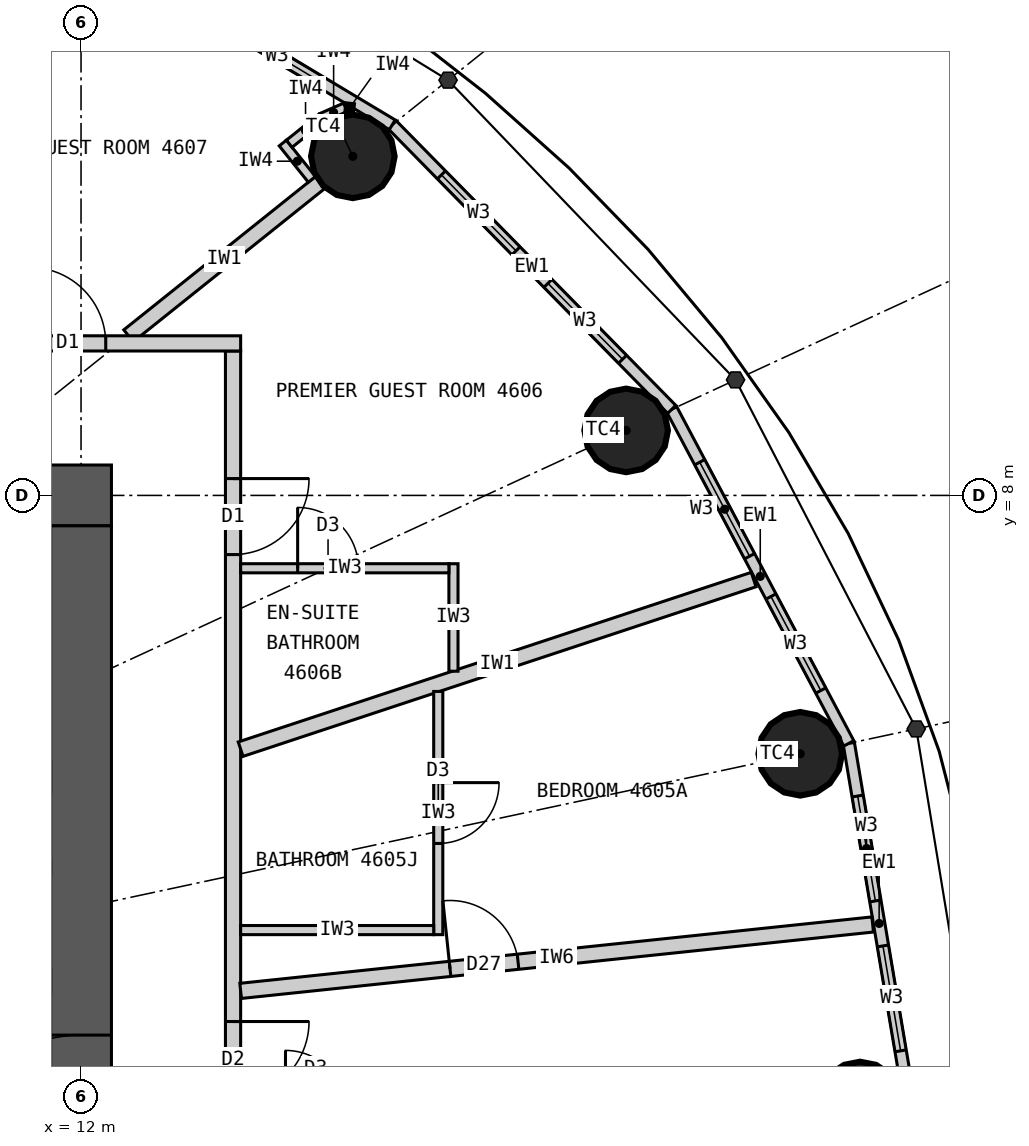
"""IFC4 building model, lengths in metres.
Left out: names, types, materials, properties, quantities, classifications, styles, units other than length and angle.
Written with IfcOpenShell. Run it as: python <this file> out.ifc"""

import sys

from ifc_helpers import new_model, si_unit, direction, frame, frame_2d, origin, origin_2d, place, context, subcontext, project, spatial, rectangle, circle, extrude, element, fill, save


model = new_model("IFC4")
c1 = context("Model", 3, precision=1e-05, world=origin(), true_north=direction((0.0, 1.0)))
c2 = subcontext(c1, "Body", "Model", "MODEL_VIEW")
j1 = project(units=[si_unit("LENGTHUNIT", "METRE"), si_unit("PLANEANGLEUNIT", "RADIAN")], contexts=[c1])
p1 = place(None, origin())
s1 = spatial("IfcSite", under=j1, at=p1, CompositionType="ELEMENT")
p2 = place(p1, origin())
s2 = spatial("IfcBuilding", under=s1, at=p2, CompositionType="ELEMENT")
p3 = place(p2, frame((0.0, 0.0, 173.1)))
s3 = spatial("IfcBuildingStorey", under=s2, at=p3, CompositionType="ELEMENT", Elevation=173.1)
for number, where, z_axis, x_axis in (
    (1, (22.25, 0.0, 0.0), (0.0, 0.0, 1.0), (1.0, 0.0, 0.0)),
    (2, (21.463, 4.601, 0.0), (0.0, 0.0, 1.0), (1.0, 0.0, 0.0)),
    (3, (19.172, 8.855, 0.0), (0.0, 0.0, 1.0), (1.0, 0.0, 0.0)),
    (4, (15.576, 12.461, 0.0), (0.0, 0.0, 1.0), (1.0, 0.0, 0.0)),
):
    element("IfcColumn", number, at=place(p3, frame(where, z_axis=z_axis, x_axis=x_axis)), inside=s3, PredefinedType="COLUMN", context=c2, shape_type="SweptSolid", body=[
        extrude(circle(Radius=0.55, at=origin_2d()), origin(), (0.0, 0.0, 1.0), 3.3),
    ])
p4 = place(p3, frame((-12.4, 8.0, 0.0), z_axis=(0.0, 0.0, 1.0), x_axis=(1.0, 0.0, 0.0)))
e5 = element("IfcWall", 5, at=p4, inside=s3, PredefinedType="SHEAR", context=c2, shape_type="SweptSolid", body=[
    extrude(rectangle(XDim=24.8, YDim=0.8, at=frame_2d((12.4, 0.0))), origin(), (0.0, 0.0, 1.0), 3.3),
])
p5 = place(p4, frame((11.1, 0.0, 0.0)))
e6 = element("IfcOpeningElement", 6, at=p5, cuts=e5, PredefinedType="OPENING", context=c2, shape_type="SweptSolid", body=[
    extrude(rectangle(XDim=1.2, YDim=2.2, at=frame_2d((0.6, 1.1))), frame((0.0, 0.41, 0.0), z_axis=(0.0, -1.0, 0.0), x_axis=(1.0, 0.0, 0.0)), (0.0, 0.0, 1.0), 0.82),
])
p6 = place(p4, frame((18.7, 0.0, 0.0)))
e7 = element("IfcOpeningElement", 7, at=p6, cuts=e5, PredefinedType="OPENING", context=c2, shape_type="SweptSolid", body=[
    extrude(rectangle(XDim=0.9, YDim=2.2, at=frame_2d((0.45, 1.1))), frame((0.0, 0.41, 0.0), z_axis=(0.0, -1.0, 0.0), x_axis=(1.0, 0.0, 0.0)), (0.0, 0.0, 1.0), 0.82),
])
p7 = place(p3, frame((12.0, -7.6, 0.0), z_axis=(0.0, 0.0, 1.0), x_axis=(0.0, 1.0, 0.0)))
e8 = element("IfcWall", 8, at=p7, inside=s3, PredefinedType="SHEAR", context=c2, shape_type="SweptSolid", body=[
    extrude(rectangle(XDim=15.2, YDim=0.8, at=frame_2d((7.6, 0.0))), origin(), (0.0, 0.0, 1.0), 3.3),
])
p8 = place(p7, frame((6.7, 0.0, 0.0)))
e9 = element("IfcOpeningElement", 9, at=p8, cuts=e8, PredefinedType="OPENING", context=c2, shape_type="SweptSolid", body=[
    extrude(rectangle(XDim=1.8, YDim=2.2, at=frame_2d((0.9, 1.1))), frame((0.0, 0.41, 0.0), z_axis=(0.0, -1.0, 0.0), x_axis=(1.0, 0.0, 0.0)), (0.0, 0.0, 1.0), 0.82),
])
p9 = place(p3, frame((22.9, 0.0, 0.0), z_axis=(0.0, 0.0, 1.0), x_axis=(-0.166162111254, 0.986098449843, 0.0)))
e10 = element("IfcWall", 10, at=p9, inside=s3, PredefinedType="ELEMENTEDWALL", context=c2, shape_type="SweptSolid", body=[
    extrude(rectangle(XDim=4.805, YDim=0.15, at=frame_2d((2.402, 0.0))), origin(), (0.0, 0.0, 1.0), 3.12),
])
p10 = place(p9, frame((0.702, 0.0, 0.9)))
e11 = element("IfcOpeningElement", 11, at=p10, cuts=e10, PredefinedType="OPENING", context=c2, shape_type="SweptSolid", body=[
    extrude(rectangle(XDim=1.4, YDim=1.9, at=frame_2d((0.7, 0.95))), frame((0.0, 0.085, 0.0), z_axis=(0.0, -1.0, 0.0), x_axis=(1.0, 0.0, 0.0)), (0.0, 0.0, 1.0), 0.17),
])
p11 = place(p9, frame((2.702, 0.0, 0.9)))
e12 = element("IfcOpeningElement", 12, at=p11, cuts=e10, PredefinedType="OPENING", context=c2, shape_type="SweptSolid", body=[
    extrude(rectangle(XDim=1.4, YDim=1.9, at=frame_2d((0.7, 0.95))), frame((0.0, 0.085, 0.0), z_axis=(0.0, -1.0, 0.0), x_axis=(1.0, 0.0, 0.0)), (0.0, 0.0, 1.0), 0.17),
])
p12 = place(p3, frame((22.102, 4.738, 0.0), z_axis=(0.0, 0.0, 1.0), x_axis=(-0.468428906714, 0.883501193748, 0.0)))
e13 = element("IfcWall", 13, at=p12, inside=s3, PredefinedType="ELEMENTEDWALL", context=c2, shape_type="SweptSolid", body=[
    extrude(rectangle(XDim=4.974, YDim=0.15, at=frame_2d((2.487, 0.0))), origin(), (0.0, 0.0, 1.0), 3.12),
])
p13 = place(p12, frame((0.787, 0.0, 0.9)))
e14 = element("IfcOpeningElement", 14, at=p13, cuts=e13, PredefinedType="OPENING", context=c2, shape_type="SweptSolid", body=[
    extrude(rectangle(XDim=1.4, YDim=1.9, at=frame_2d((0.7, 0.95))), frame((0.0, 0.085, 0.0), z_axis=(0.0, -1.0, 0.0), x_axis=(1.0, 0.0, 0.0)), (0.0, 0.0, 1.0), 0.17),
])
p14 = place(p12, frame((2.787, 0.0, 0.9)))
e15 = element("IfcOpeningElement", 15, at=p14, cuts=e13, PredefinedType="OPENING", context=c2, shape_type="SweptSolid", body=[
    extrude(rectangle(XDim=1.4, YDim=1.9, at=frame_2d((0.7, 0.95))), frame((0.0, 0.085, 0.0), z_axis=(0.0, -1.0, 0.0), x_axis=(1.0, 0.0, 0.0)), (0.0, 0.0, 1.0), 0.17),
])
p15 = place(p3, frame((19.772, 9.132, 0.0), z_axis=(0.0, 0.0, 1.0), x_axis=(-0.700727467776, 0.71342905457, 0.0)))
e16 = element("IfcWall", 16, at=p15, inside=s3, PredefinedType="ELEMENTEDWALL", context=c2, shape_type="SweptSolid", body=[
    extrude(rectangle(XDim=5.247, YDim=0.15, at=frame_2d((2.624, 0.0))), origin(), (0.0, 0.0, 1.0), 3.12),
])
p16 = place(p15, frame((0.924, 0.0, 0.9)))
e17 = element("IfcOpeningElement", 17, at=p16, cuts=e16, PredefinedType="OPENING", context=c2, shape_type="SweptSolid", body=[
    extrude(rectangle(XDim=1.4, YDim=1.9, at=frame_2d((0.7, 0.95))), frame((0.0, 0.085, 0.0), z_axis=(0.0, -1.0, 0.0), x_axis=(1.0, 0.0, 0.0)), (0.0, 0.0, 1.0), 0.17),
])
p17 = place(p15, frame((2.924, 0.0, 0.9)))
e18 = element("IfcOpeningElement", 18, at=p17, cuts=e16, PredefinedType="OPENING", context=c2, shape_type="SweptSolid", body=[
    extrude(rectangle(XDim=1.4, YDim=1.9, at=frame_2d((0.7, 0.95))), frame((0.0, 0.085, 0.0), z_axis=(0.0, -1.0, 0.0), x_axis=(1.0, 0.0, 0.0)), (0.0, 0.0, 1.0), 0.17),
])
p18 = place(p3, frame((16.095, 12.876, 0.0), z_axis=(0.0, 0.0, 1.0), x_axis=(-0.857695199231, 0.514158482587, 0.0)))
e19 = element("IfcWall", 19, at=p18, inside=s3, PredefinedType="ELEMENTEDWALL", context=c2, shape_type="SweptSolid", body=[
    extrude(rectangle(XDim=5.536, YDim=0.15, at=frame_2d((2.768, 0.0))), origin(), (0.0, 0.0, 1.0), 3.12),
])
p19 = place(p18, frame((1.068, 0.0, 0.9)))
e20 = element("IfcOpeningElement", 20, at=p19, cuts=e19, PredefinedType="OPENING", context=c2, shape_type="SweptSolid", body=[
    extrude(rectangle(XDim=1.4, YDim=1.9, at=frame_2d((0.7, 0.95))), frame((0.0, 0.085, 0.0), z_axis=(0.0, -1.0, 0.0), x_axis=(1.0, 0.0, 0.0)), (0.0, 0.0, 1.0), 0.17),
])
p20 = place(p18, frame((3.068, 0.0, 0.9)))
e21 = element("IfcOpeningElement", 21, at=p20, cuts=e19, PredefinedType="OPENING", context=c2, shape_type="SweptSolid", body=[
    extrude(rectangle(XDim=1.4, YDim=1.9, at=frame_2d((0.7, 0.95))), frame((0.0, 0.085, 0.0), z_axis=(0.0, -1.0, 0.0), x_axis=(1.0, 0.0, 0.0)), (0.0, 0.0, 1.0), 0.17),
])
p21 = place(p3, frame((14.0, -9.9, 0.0), z_axis=(0.0, 0.0, 1.0), x_axis=(0.0, 1.0, 0.0)))
e22 = element("IfcWall", 22, at=p21, inside=s3, PredefinedType="PARTITIONING", context=c2, shape_type="SweptSolid", body=[
    extrude(rectangle(XDim=19.8, YDim=0.2, at=frame_2d((9.9, 0.0))), origin(), (0.0, 0.0, 1.0), 3.12),
])
p22 = place(p21, frame((3.688, 0.0, 0.0)))
e23 = element("IfcOpeningElement", 23, at=p22, cuts=e22, PredefinedType="OPENING", context=c2, shape_type="SweptSolid", body=[
    extrude(rectangle(XDim=1.0, YDim=2.2, at=frame_2d((0.5, 1.1))), frame((0.0, 0.11, 0.0), z_axis=(0.0, -1.0, 0.0), x_axis=(1.0, 0.0, 0.0)), (0.0, 0.0, 1.0), 0.22),
])
p23 = place(p21, frame((9.979, 0.0, 0.0)))
e24 = element("IfcOpeningElement", 24, at=p23, cuts=e22, PredefinedType="OPENING", context=c2, shape_type="SweptSolid", body=[
    extrude(rectangle(XDim=1.0, YDim=2.2, at=frame_2d((0.5, 1.1))), frame((0.0, 0.11, 0.0), z_axis=(0.0, -1.0, 0.0), x_axis=(1.0, 0.0, 0.0)), (0.0, 0.0, 1.0), 0.22),
])
p24 = place(p21, frame((17.122, 0.0, 0.0)))
e25 = element("IfcOpeningElement", 25, at=p24, cuts=e22, PredefinedType="OPENING", context=c2, shape_type="SweptSolid", body=[
    extrude(rectangle(XDim=1.0, YDim=2.2, at=frame_2d((0.5, 1.1))), frame((0.0, 0.11, 0.0), z_axis=(0.0, -1.0, 0.0), x_axis=(1.0, 0.0, 0.0)), (0.0, 0.0, 1.0), 0.22),
])
p25 = place(p3, frame((14.1, 1.481, 0.0), z_axis=(0.0, 0.0, 1.0), x_axis=(0.994524794819, 0.104500873159, 0.0)))
e26 = element("IfcWall", 26, at=p25, inside=s3, PredefinedType="PARTITIONING", context=c2, shape_type="SweptSolid", body=[
    extrude(rectangle(XDim=8.362, YDim=0.2, at=frame_2d((4.181, 0.0))), origin(), (0.0, 0.0, 1.0), 2.47),
])
p26 = place(p25, frame((2.77, 0.0, 0.0)))
e27 = element("IfcOpeningElement", 27, at=p26, cuts=e26, PredefinedType="OPENING", context=c2, shape_type="SweptSolid", body=[
    extrude(rectangle(XDim=0.9, YDim=2.1, at=frame_2d((0.45, 1.05))), frame((0.0, 0.11, 0.0), z_axis=(0.0, -1.0, 0.0), x_axis=(1.0, 0.0, 0.0)), (0.0, 0.0, 1.0), 0.22),
])
p27 = place(p3, frame((14.1, 4.661, 0.0), z_axis=(0.0, 0.0, 1.0), x_axis=(0.949453216399, 0.313908569285, 0.0)))
e28 = element("IfcWall", 28, at=p27, inside=s3, PredefinedType="PARTITIONING", context=c2, shape_type="SweptSolid", body=[
    extrude(rectangle(XDim=7.109, YDim=0.2, at=frame_2d((3.554, 0.0))), origin(), (0.0, 0.0, 1.0), 3.12),
])
p28 = place(p3, frame((12.625, 10.1, 0.0), z_axis=(0.0, 0.0, 1.0), x_axis=(0.780876185034, 0.624685827954, 0.0)))
e29 = element("IfcWall", 29, at=p28, inside=s3, PredefinedType="PARTITIONING", context=c2, shape_type="SweptSolid", body=[
    extrude(rectangle(XDim=3.229, YDim=0.2, at=frame_2d((1.615, 0.0))), origin(), (0.0, 0.0, 1.0), 2.42),
])
p29 = place(p3, frame((16.7, 5.421, 0.0), z_axis=(0.0, 0.0, 1.0), x_axis=(0.0, -1.0, 0.0)))
e30 = element("IfcWall", 30, at=p29, inside=s3, PredefinedType="PARTITIONING", context=c2, shape_type="SweptSolid", body=[
    extrude(rectangle(XDim=3.2, YDim=0.12, at=frame_2d((1.6, 0.0))), origin(), (0.0, 0.0, 1.0), 3.12),
])
p30 = place(p29, frame((1.2, 0.0, 0.0)))
e31 = element("IfcOpeningElement", 31, at=p30, cuts=e30, PredefinedType="OPENING", context=c2, shape_type="SweptSolid", body=[
    extrude(rectangle(XDim=0.8, YDim=2.1, at=frame_2d((0.4, 1.05))), frame((0.0, 0.07, 0.0), z_axis=(0.0, -1.0, 0.0), x_axis=(1.0, 0.0, 0.0)), (0.0, 0.0, 1.0), 0.14),
])
p31 = place(p3, frame((14.1, 2.281, 0.0), z_axis=(0.0, 0.0, 1.0), x_axis=(1.0, 0.0, 0.0)))
e32 = element("IfcWall", 32, at=p31, inside=s3, PredefinedType="PARTITIONING", context=c2, shape_type="SweptSolid", body=[
    extrude(rectangle(XDim=2.54, YDim=0.12, at=frame_2d((1.27, 0.0))), origin(), (0.0, 0.0, 1.0), 3.12),
])
p32 = place(p3, frame((16.9, 5.687, 0.0), z_axis=(0.0, 0.0, 1.0), x_axis=(0.0, 1.0, 0.0)))
e33 = element("IfcWall", 33, at=p32, inside=s3, PredefinedType="PARTITIONING", context=c2, shape_type="SweptSolid", body=[
    extrude(rectangle(XDim=1.414, YDim=0.12, at=frame_2d((0.707, 0.0))), origin(), (0.0, 0.0, 1.0), 3.12),
])
p33 = place(p3, frame((14.1, 7.042, 0.0), z_axis=(0.0, 0.0, 1.0), x_axis=(1.0, 0.0, 0.0)))
e34 = element("IfcWall", 34, at=p33, inside=s3, PredefinedType="PARTITIONING", context=c2, shape_type="SweptSolid", body=[
    extrude(rectangle(XDim=2.74, YDim=0.12, at=frame_2d((1.37, 0.0))), origin(), (0.0, 0.0, 1.0), 3.12),
])
p34 = place(p33, frame((0.75, 0.0, 0.0)))
e35 = element("IfcOpeningElement", 35, at=p34, cuts=e34, PredefinedType="OPENING", context=c2, shape_type="SweptSolid", body=[
    extrude(rectangle(XDim=0.8, YDim=2.1, at=frame_2d((0.4, 1.05))), frame((0.0, 0.07, 0.0), z_axis=(0.0, -1.0, 0.0), x_axis=(1.0, 0.0, 0.0)), (0.0, 0.0, 1.0), 0.14),
])
p35 = place(p3, frame((1.67, 10.0, 0.0), z_axis=(0.0, 0.0, 1.0), x_axis=(1.0, 0.0, 0.0)))
e36 = element("IfcWall", 36, at=p35, inside=s3, PredefinedType="PARTITIONING", context=c2, shape_type="SweptSolid", body=[
    extrude(rectangle(XDim=12.43, YDim=0.2, at=frame_2d((6.215, 0.0))), origin(), (0.0, 0.0, 1.0), 3.12),
])
p36 = place(p35, frame((9.655, 0.0, 0.0)))
e37 = element("IfcOpeningElement", 37, at=p36, cuts=e36, PredefinedType="OPENING", context=c2, shape_type="SweptSolid", body=[
    extrude(rectangle(XDim=1.0, YDim=2.2, at=frame_2d((0.5, 1.1))), frame((0.0, 0.11, 0.0), z_axis=(0.0, -1.0, 0.0), x_axis=(1.0, 0.0, 0.0)), (0.0, 0.0, 1.0), 0.22),
])
p37 = place(p3, frame((15.037, 12.158, 0.0), z_axis=(0.0, 0.0, 1.0), x_axis=(-0.624840920722, 0.78075208856, 0.0)))
e38 = element("IfcWall", 38, at=p37, inside=s3, PredefinedType="PARTITIONING", context=c2, shape_type="SweptSolid", body=[
    extrude(rectangle(XDim=0.612, YDim=0.12, at=frame_2d((0.306, 0.0))), origin(), (0.0, 0.0, 1.0), 3.12),
])
p38 = place(p3, frame((14.739, 12.627, 0.0), z_axis=(0.0, 0.0, 1.0), x_axis=(0.780912119987, 0.624640905527, 0.0)))
e39 = element("IfcWall", 39, at=p38, inside=s3, PredefinedType="PARTITIONING", context=c2, shape_type="SweptSolid", body=[
    extrude(rectangle(XDim=0.55, YDim=0.12, at=frame_2d((0.275, 0.0))), origin(), (0.0, 0.0, 1.0), 3.12),
])
p39 = place(p3, frame((15.169, 12.97, 0.0), z_axis=(0.0, 0.0, 1.0), x_axis=(0.915974725257, 0.401235968838, 0.0)))
e40 = element("IfcWall", 40, at=p39, inside=s3, PredefinedType="PARTITIONING", context=c2, shape_type="SweptSolid", body=[
    extrude(rectangle(XDim=0.338, YDim=0.12, at=frame_2d((0.169, 0.0))), origin(), (0.0, 0.0, 1.0), 3.12),
])
p40 = place(p3, frame((15.478, 13.106, 0.0), z_axis=(0.0, 0.0, 1.0), x_axis=(0.993778813557, -0.111371763588, 0.0)))
e41 = element("IfcWall", 41, at=p40, inside=s3, PredefinedType="PARTITIONING", context=c2, shape_type="SweptSolid", body=[
    extrude(rectangle(XDim=0.114, YDim=0.12, at=frame_2d((0.057, 0.0))), origin(), (0.0, 0.0, 1.0), 3.12),
])
p41 = place(p10, origin())
e42 = element("IfcWindow", 42, at=p41, inside=s3, PartitioningType="SINGLE_PANEL", PredefinedType="WINDOW", context=c2, shape_type="SweptSolid", body=[
    extrude(rectangle(XDim=1.4, YDim=1.9, at=frame_2d((0.7, 0.95))), frame((0.0, 0.03, 0.0), z_axis=(0.0, -1.0, 0.0), x_axis=(1.0, 0.0, 0.0)), (0.0, 0.0, 1.0), 0.06),
])
fill(e11, e42)
p42 = place(p11, origin())
e43 = element("IfcWindow", 43, at=p42, inside=s3, PartitioningType="SINGLE_PANEL", PredefinedType="WINDOW", context=c2, shape_type="SweptSolid", body=[
    extrude(rectangle(XDim=1.4, YDim=1.9, at=frame_2d((0.7, 0.95))), frame((0.0, 0.03, 0.0), z_axis=(0.0, -1.0, 0.0), x_axis=(1.0, 0.0, 0.0)), (0.0, 0.0, 1.0), 0.06),
])
fill(e12, e43)
p43 = place(p13, origin())
e44 = element("IfcWindow", 44, at=p43, inside=s3, PartitioningType="SINGLE_PANEL", PredefinedType="WINDOW", context=c2, shape_type="SweptSolid", body=[
    extrude(rectangle(XDim=1.4, YDim=1.9, at=frame_2d((0.7, 0.95))), frame((0.0, 0.03, 0.0), z_axis=(0.0, -1.0, 0.0), x_axis=(1.0, 0.0, 0.0)), (0.0, 0.0, 1.0), 0.06),
])
fill(e14, e44)
p44 = place(p14, origin())
e45 = element("IfcWindow", 45, at=p44, inside=s3, PartitioningType="SINGLE_PANEL", PredefinedType="WINDOW", context=c2, shape_type="SweptSolid", body=[
    extrude(rectangle(XDim=1.4, YDim=1.9, at=frame_2d((0.7, 0.95))), frame((0.0, 0.03, 0.0), z_axis=(0.0, -1.0, 0.0), x_axis=(1.0, 0.0, 0.0)), (0.0, 0.0, 1.0), 0.06),
])
fill(e15, e45)
p45 = place(p16, origin())
e46 = element("IfcWindow", 46, at=p45, inside=s3, PartitioningType="SINGLE_PANEL", PredefinedType="WINDOW", context=c2, shape_type="SweptSolid", body=[
    extrude(rectangle(XDim=1.4, YDim=1.9, at=frame_2d((0.7, 0.95))), frame((0.0, 0.03, 0.0), z_axis=(0.0, -1.0, 0.0), x_axis=(1.0, 0.0, 0.0)), (0.0, 0.0, 1.0), 0.06),
])
fill(e17, e46)
p46 = place(p17, origin())
e47 = element("IfcWindow", 47, at=p46, inside=s3, PartitioningType="SINGLE_PANEL", PredefinedType="WINDOW", context=c2, shape_type="SweptSolid", body=[
    extrude(rectangle(XDim=1.4, YDim=1.9, at=frame_2d((0.7, 0.95))), frame((0.0, 0.03, 0.0), z_axis=(0.0, -1.0, 0.0), x_axis=(1.0, 0.0, 0.0)), (0.0, 0.0, 1.0), 0.06),
])
fill(e18, e47)
p47 = place(p19, origin())
e48 = element("IfcWindow", 48, at=p47, inside=s3, PartitioningType="SINGLE_PANEL", PredefinedType="WINDOW", context=c2, shape_type="SweptSolid", body=[
    extrude(rectangle(XDim=1.4, YDim=1.9, at=frame_2d((0.7, 0.95))), frame((0.0, 0.03, 0.0), z_axis=(0.0, -1.0, 0.0), x_axis=(1.0, 0.0, 0.0)), (0.0, 0.0, 1.0), 0.06),
])
fill(e20, e48)
p48 = place(p23, origin())
e49 = element("IfcDoor", 49, at=p48, inside=s3, OperationType="SINGLE_SWING_RIGHT", PredefinedType="DOOR", context=c2, shape_type="SweptSolid", body=[
    extrude(rectangle(XDim=1.0, YDim=2.2, at=frame_2d((0.5, 1.1))), frame((0.0, 0.025, 0.0), z_axis=(0.0, -1.0, 0.0), x_axis=(1.0, 0.0, 0.0)), (0.0, 0.0, 1.0), 0.05),
])
fill(e24, e49)
p49 = place(p30, origin())
e50 = element("IfcDoor", 50, at=p49, inside=s3, OperationType="SINGLE_SWING_LEFT", PredefinedType="DOOR", context=c2, shape_type="SweptSolid", body=[
    extrude(rectangle(XDim=0.8, YDim=2.1, at=frame_2d((0.4, 1.05))), frame((0.0, 0.025, 0.0), z_axis=(0.0, -1.0, 0.0), x_axis=(1.0, 0.0, 0.0)), (0.0, 0.0, 1.0), 0.05),
])
fill(e31, e50)
p50 = place(p26, origin())
e51 = element("IfcDoor", 51, at=p50, inside=s3, OperationType="SINGLE_SWING_LEFT", PredefinedType="DOOR", context=c2, shape_type="SweptSolid", body=[
    extrude(rectangle(XDim=0.9, YDim=2.1, at=frame_2d((0.45, 1.05))), frame((0.0, 0.025, 0.0), z_axis=(0.0, -1.0, 0.0), x_axis=(1.0, 0.0, 0.0)), (0.0, 0.0, 1.0), 0.05),
])
fill(e27, e51)
p51 = place(p34, origin())
e52 = element("IfcDoor", 52, at=p51, inside=s3, OperationType="SINGLE_SWING_LEFT", PredefinedType="DOOR", context=c2, shape_type="SweptSolid", body=[
    extrude(rectangle(XDim=0.8, YDim=2.1, at=frame_2d((0.4, 1.05))), frame((0.0, 0.025, 0.0), z_axis=(0.0, -1.0, 0.0), x_axis=(1.0, 0.0, 0.0)), (0.0, 0.0, 1.0), 0.05),
])
fill(e35, e52)
p52 = place(p24, origin())
e53 = element("IfcDoor", 53, at=p52, inside=s3, OperationType="SINGLE_SWING_RIGHT", PredefinedType="DOOR", context=c2, shape_type="SweptSolid", body=[
    extrude(rectangle(XDim=1.0, YDim=2.2, at=frame_2d((0.5, 1.1))), frame((0.0, 0.025, 0.0), z_axis=(0.0, -1.0, 0.0), x_axis=(1.0, 0.0, 0.0)), (0.0, 0.0, 1.0), 0.05),
])
fill(e25, e53)
p53 = place(p36, origin())
e54 = element("IfcDoor", 54, at=p53, inside=s3, OperationType="SINGLE_SWING_LEFT", PredefinedType="DOOR", context=c2, shape_type="SweptSolid", body=[
    extrude(rectangle(XDim=1.0, YDim=2.2, at=frame_2d((0.5, 1.1))), frame((0.0, 0.025, 0.0), z_axis=(0.0, -1.0, 0.0), x_axis=(1.0, 0.0, 0.0)), (0.0, 0.0, 1.0), 0.05),
])
fill(e37, e54)
p54 = place(p8, origin())
e55 = element("IfcDoor", 55, at=p54, inside=s3, OperationType="DOUBLE_DOOR_DOUBLE_SWING", PredefinedType="DOOR", context=c2, shape_type="SweptSolid", body=[
    extrude(rectangle(XDim=1.8, YDim=2.2, at=frame_2d((0.9, 1.1))), frame((0.0, 0.025, 0.0), z_axis=(0.0, -1.0, 0.0), x_axis=(1.0, 0.0, 0.0)), (0.0, 0.0, 1.0), 0.05),
])
fill(e9, e55)
save(model, sys.argv[1])
